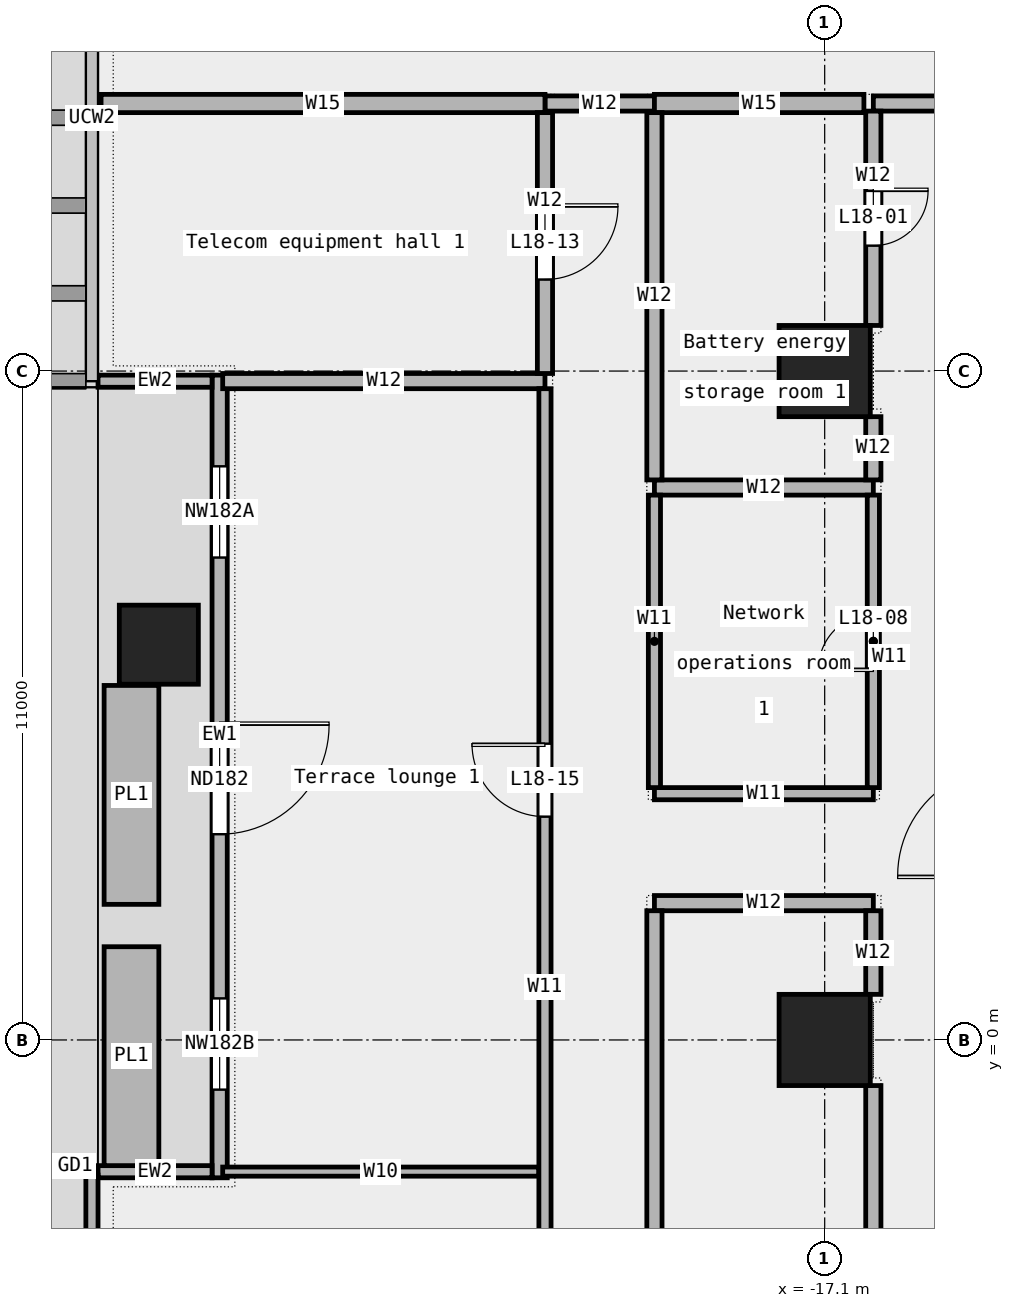
"""IFC4 building model, lengths in metres.
Left out: names, types, materials, properties, quantities, classifications, styles, units other than length and angle.
Written with IfcOpenShell. Run it as: python <this file> out.ifc"""

import sys

from ifc_helpers import new_model, si_unit, direction, frame, frame_2d, origin, origin_2d, place, context, subcontext, project, spatial, rectangle, extrude, element, fill, save


model = new_model("IFC4")
c1 = context("Model", 3, precision=1e-05, world=origin(), true_north=direction((0.0, 1.0)))
c2 = subcontext(c1, "Body", "Model", "MODEL_VIEW")
j1 = project(units=[si_unit("LENGTHUNIT", "METRE"), si_unit("PLANEANGLEUNIT", "RADIAN")], contexts=[c1])
p1 = place(None, origin())
s1 = spatial("IfcSite", under=j1, at=p1, CompositionType="ELEMENT")
p2 = place(p1, origin())
s2 = spatial("IfcBuilding", under=s1, at=p2, CompositionType="ELEMENT")
p3 = place(p2, frame((0.0, 0.0, 94.6)))
s3 = spatial("IfcBuildingStorey", under=s2, at=p3, CompositionType="ELEMENT", Elevation=94.6)
p4 = place(p3, frame((-28.05, 6.5, 0.0), z_axis=(0.0, 0.0, 1.0), x_axis=(1.0, 0.0, 0.0)))
e1 = element("IfcColumn", 1, at=p4, inside=s3, PredefinedType="COLUMN", context=c2, shape_type="SweptSolid", body=[
    extrude(rectangle(XDim=1.3, YDim=1.3, at=origin_2d()), origin(), (0.0, 0.0, 1.0), 4.05),
])
for number, where, z_axis, x_axis in (
    (2, (-17.1, 0.0, 0.0), (0.0, 0.0, 1.0), (1.0, 0.0, 0.0)),
    (3, (-17.1, 11.0, 0.0), (0.0, 0.0, 1.0), (1.0, 0.0, 0.0)),
):
    element("IfcColumn", number, at=place(p3, frame(where, z_axis=z_axis, x_axis=x_axis)), inside=s3, PredefinedType="COLUMN", context=c2, shape_type="SweptSolid", body=[
        extrude(rectangle(XDim=1.5, YDim=1.5, at=origin_2d()), origin(), (0.0, 0.0, 1.0), 4.05),
    ])
p5 = place(p3, frame((-27.05, 10.933, 0.0), z_axis=(0.0, 0.0, 1.0), x_axis=(0.0, -1.0, 0.0)))
e4 = element("IfcWall", 4, at=p5, inside=s3, PredefinedType="STANDARD", context=c2, shape_type="SweptSolid", body=[
    extrude(rectangle(XDim=13.2, YDim=0.25, at=frame_2d((6.6, 0.0))), origin(), (0.0, 0.0, 1.0), 4.05),
])
p6 = place(p5, frame((1.5, 0.0, 0.45)))
e5 = element("IfcOpeningElement", 5, at=p6, cuts=e4, PredefinedType="OPENING", context=c2, shape_type="SweptSolid", body=[
    extrude(rectangle(XDim=1.5, YDim=3.0, at=frame_2d((0.75, 1.5))), frame((0.0, 0.137, 0.0), z_axis=(0.0, -1.0, 0.0), x_axis=(1.0, 0.0, 0.0)), (0.0, 0.0, 1.0), 0.274),
])
p7 = place(p5, frame((5.75, 0.0, 0.0)))
e6 = element("IfcOpeningElement", 6, at=p7, cuts=e4, PredefinedType="OPENING", context=c2, shape_type="SweptSolid", body=[
    extrude(rectangle(XDim=1.8, YDim=2.4, at=frame_2d((0.9, 1.2))), frame((0.0, 0.137, 0.0), z_axis=(0.0, -1.0, 0.0), x_axis=(1.0, 0.0, 0.0)), (0.0, 0.0, 1.0), 0.274),
])
p8 = place(p5, frame((10.25, 0.0, 0.45)))
e7 = element("IfcOpeningElement", 7, at=p8, cuts=e4, PredefinedType="OPENING", context=c2, shape_type="SweptSolid", body=[
    extrude(rectangle(XDim=1.5, YDim=3.0, at=frame_2d((0.75, 1.5))), frame((0.0, 0.137, 0.0), z_axis=(0.0, -1.0, 0.0), x_axis=(1.0, 0.0, 0.0)), (0.0, 0.0, 1.0), 0.274),
])
for number, where, z_axis, x_axis in (
    (8, (-29.05, 10.833, 0.0), (0.0, 0.0, 1.0), (1.0, 0.0, 0.0)),
    (9, (-29.05, -2.167, 0.0), (0.0, 0.0, 1.0), (1.0, 0.0, 0.0)),
):
    element("IfcWall", number, at=place(p3, frame(where, z_axis=z_axis, x_axis=x_axis)), inside=s3, PredefinedType="STANDARD", context=c2, shape_type="SweptSolid", body=[
        extrude(rectangle(XDim=1.875, YDim=0.2, at=frame_2d((0.938, 0.0))), origin(), (0.0, 0.0, 1.0), 4.05),
    ])
for number, where, z_axis, x_axis in (
    (10, (-28.5, 5.83, 0.0), (0.0, 0.0, 1.0), (0.0, -1.0, 0.0)),
    (11, (-28.5, 1.533, 0.0), (0.0, 0.0, 1.0), (0.0, -1.0, 0.0)),
):
    element("IfcWall", number, at=place(p3, frame(where, z_axis=z_axis, x_axis=x_axis)), inside=s3, PredefinedType="STANDARD", context=c2, shape_type="SweptSolid", body=[
        extrude(rectangle(XDim=3.6, YDim=0.9, at=frame_2d((1.8, 0.0))), origin(), (0.0, 0.0, 1.0), 0.7),
    ])
p9 = place(p3, frame((-29.15, -2.222, 0.0), z_axis=(0.0, 0.0, 1.0), x_axis=(0.0, -1.0, 0.0)))
e12 = element("IfcWall", 12, at=p9, inside=s3, PredefinedType="STANDARD", context=c2, shape_type="SweptSolid", body=[
    extrude(rectangle(XDim=4.223, YDim=0.2, at=frame_2d((2.112, 0.0))), origin(), (0.0, 0.0, 1.0), 4.05),
])
p10 = place(p9, frame((1.295, 0.0, 0.0)))
e13 = element("IfcOpeningElement", 13, at=p10, cuts=e12, PredefinedType="OPENING", context=c2, shape_type="SweptSolid", body=[
    extrude(rectangle(XDim=1.8, YDim=2.4, at=frame_2d((0.9, 1.2))), frame((0.0, 0.112, 0.0), z_axis=(0.0, -1.0, 0.0), x_axis=(1.0, 0.0, 0.0)), (0.0, 0.0, 1.0), 0.224),
])
p11 = place(p3, frame((-27.0, -2.165, 0.0), z_axis=(0.0, 0.0, 1.0), x_axis=(1.0, 0.0, 0.0)))
e14 = element("IfcWall", 14, at=p11, inside=s3, PredefinedType="PARTITIONING", context=c2, shape_type="SweptSolid", body=[
    extrude(rectangle(XDim=5.2, YDim=0.15, at=frame_2d((2.6, 0.0))), origin(), (0.0, 0.0, 1.0), 4.05),
])
p12 = place(p3, frame((-19.9, 2.25, 0.0), z_axis=(0.0, 0.0, 1.0), x_axis=(1.0, 0.0, 0.0)))
e15 = element("IfcWall", 15, at=p12, inside=s3, PredefinedType="PARTITIONING", context=c2, shape_type="SweptSolid", body=[
    extrude(rectangle(XDim=3.6, YDim=0.25, at=frame_2d((1.8, 0.0))), origin(), (0.0, 0.0, 1.0), 4.05),
])
p13 = place(p3, frame((-19.9, 4.05, 0.0), z_axis=(0.0, 0.0, 1.0), x_axis=(1.0, 0.0, 0.0)))
e16 = element("IfcWall", 16, at=p13, inside=s3, PredefinedType="PARTITIONING", context=c2, shape_type="SweptSolid", body=[
    extrude(rectangle(XDim=3.6, YDim=0.2, at=frame_2d((1.8, 0.0))), origin(), (0.0, 0.0, 1.0), 4.05),
])
p14 = place(p3, frame((-19.9, 9.085, 0.0), z_axis=(0.0, 0.0, 1.0), x_axis=(1.0, 0.0, 0.0)))
e17 = element("IfcWall", 17, at=p14, inside=s3, PredefinedType="PARTITIONING", context=c2, shape_type="SweptSolid", body=[
    extrude(rectangle(XDim=3.6, YDim=0.25, at=frame_2d((1.8, 0.0))), origin(), (0.0, 0.0, 1.0), 4.05),
])
p15 = place(p3, frame((-27.0, 10.835, 0.0), z_axis=(0.0, 0.0, 1.0), x_axis=(1.0, 0.0, 0.0)))
e18 = element("IfcWall", 18, at=p15, inside=s3, PredefinedType="PARTITIONING", context=c2, shape_type="SweptSolid", body=[
    extrude(rectangle(XDim=5.3, YDim=0.25, at=frame_2d((2.65, 0.0))), origin(), (0.0, 0.0, 1.0), 4.05),
])
p16 = place(p3, frame((-21.7, 15.4, 0.0), z_axis=(0.0, 0.0, 1.0), x_axis=(1.0, 0.0, 0.0)))
e19 = element("IfcWall", 19, at=p16, inside=s3, PredefinedType="PARTITIONING", context=c2, shape_type="SweptSolid", body=[
    extrude(rectangle(XDim=1.8, YDim=0.25, at=frame_2d((0.9, 0.0))), origin(), (0.0, 0.0, 1.0), 4.05),
])
p17 = place(p3, frame((-16.3, 15.4, 0.0), z_axis=(0.0, 0.0, 1.0), x_axis=(1.0, 0.0, 0.0)))
e20 = element("IfcWall", 20, at=p17, inside=s3, PredefinedType="PARTITIONING", context=c2, shape_type="SweptSolid", body=[
    extrude(rectangle(XDim=17.3, YDim=0.25, at=frame_2d((8.65, 0.0))), origin(), (0.0, 0.0, 1.0), 4.05),
])
p18 = place(p17, frame((12.085, 0.0, 0.0)))
e21 = element("IfcOpeningElement", 21, at=p18, cuts=e20, PredefinedType="OPENING", context=c2, shape_type="SweptSolid", body=[
    extrude(rectangle(XDim=1.2, YDim=2.1, at=frame_2d((0.6, 1.05))), frame((0.0, 0.137, 0.0), z_axis=(0.0, -1.0, 0.0), x_axis=(1.0, 0.0, 0.0)), (0.0, 0.0, 1.0), 0.274),
])
p19 = place(p17, frame((3.135, 0.0, 0.0)))
e22 = element("IfcOpeningElement", 22, at=p19, cuts=e20, PredefinedType="OPENING", context=c2, shape_type="SweptSolid", body=[
    extrude(rectangle(XDim=1.8, YDim=2.1, at=frame_2d((0.9, 1.05))), frame((0.0, 0.137, 0.0), z_axis=(0.0, -1.0, 0.0), x_axis=(1.0, 0.0, 0.0)), (0.0, 0.0, 1.0), 0.274),
])
p20 = place(p3, frame((-29.0, 15.4, 0.0), z_axis=(0.0, 0.0, 1.0), x_axis=(1.0, 0.0, 0.0)))
e23 = element("IfcWall", 23, at=p20, inside=s3, PredefinedType="PARTITIONING", context=c2, shape_type="SweptSolid", body=[
    extrude(rectangle(XDim=7.3, YDim=0.3, at=frame_2d((3.65, 0.0))), origin(), (0.0, 0.0, 1.0), 4.05),
])
p21 = place(p3, frame((-19.9, 15.4, 0.0), z_axis=(0.0, 0.0, 1.0), x_axis=(1.0, 0.0, 0.0)))
e24 = element("IfcWall", 24, at=p21, inside=s3, PredefinedType="PARTITIONING", context=c2, shape_type="SweptSolid", body=[
    extrude(rectangle(XDim=3.445, YDim=0.3, at=frame_2d((1.722, 0.0))), origin(), (0.0, 0.0, 1.0), 4.05),
])
p22 = place(p3, frame((-21.7, -8.975, 0.0), z_axis=(0.0, 0.0, 1.0), x_axis=(0.0, 1.0, 0.0)))
e25 = element("IfcWall", 25, at=p22, inside=s3, PredefinedType="PARTITIONING", context=c2, shape_type="SweptSolid", body=[
    extrude(rectangle(XDim=19.685, YDim=0.2, at=frame_2d((9.843, 0.0))), origin(), (0.0, 0.0, 1.0), 4.05),
])
p23 = place(p22, frame((2.805, 0.0, 0.0)))
e26 = element("IfcOpeningElement", 26, at=p23, cuts=e25, PredefinedType="OPENING", context=c2, shape_type="SweptSolid", body=[
    extrude(rectangle(XDim=1.2, YDim=2.1, at=frame_2d((0.6, 1.05))), frame((0.0, 0.112, 0.0), z_axis=(0.0, -1.0, 0.0), x_axis=(1.0, 0.0, 0.0)), (0.0, 0.0, 1.0), 0.224),
])
p24 = place(p22, frame((12.647, 0.0, 0.0)))
e27 = element("IfcOpeningElement", 27, at=p24, cuts=e25, PredefinedType="OPENING", context=c2, shape_type="SweptSolid", body=[
    extrude(rectangle(XDim=1.2, YDim=2.1, at=frame_2d((0.6, 1.05))), frame((0.0, 0.112, 0.0), z_axis=(0.0, -1.0, 0.0), x_axis=(1.0, 0.0, 0.0)), (0.0, 0.0, 1.0), 0.224),
])
p25 = place(p3, frame((-21.7, 10.96, 0.0), z_axis=(0.0, 0.0, 1.0), x_axis=(0.0, 1.0, 0.0)))
e28 = element("IfcWall", 28, at=p25, inside=s3, PredefinedType="PARTITIONING", context=c2, shape_type="SweptSolid", body=[
    extrude(rectangle(XDim=4.29, YDim=0.25, at=frame_2d((2.145, 0.0))), origin(), (0.0, 0.0, 1.0), 4.05),
])
p26 = place(p25, frame((1.545, 0.0, 0.0)))
e29 = element("IfcOpeningElement", 29, at=p26, cuts=e28, PredefinedType="OPENING", context=c2, shape_type="SweptSolid", body=[
    extrude(rectangle(XDim=1.2, YDim=2.1, at=frame_2d((0.6, 1.05))), frame((0.0, 0.137, 0.0), z_axis=(0.0, -1.0, 0.0), x_axis=(1.0, 0.0, 0.0)), (0.0, 0.0, 1.0), 0.274),
])
p27 = place(p3, frame((-19.9, 4.15, 0.0), z_axis=(0.0, 0.0, 1.0), x_axis=(0.0, 1.0, 0.0)))
e30 = element("IfcWall", 30, at=p27, inside=s3, PredefinedType="PARTITIONING", context=c2, shape_type="SweptSolid", body=[
    extrude(rectangle(XDim=4.81, YDim=0.2, at=frame_2d((2.405, 0.0))), origin(), (0.0, 0.0, 1.0), 4.05),
])
p28 = place(p3, frame((-19.9, -8.95, 0.0), z_axis=(0.0, 0.0, 1.0), x_axis=(0.0, 1.0, 0.0)))
e31 = element("IfcWall", 31, at=p28, inside=s3, PredefinedType="PARTITIONING", context=c2, shape_type="SweptSolid", body=[
    extrude(rectangle(XDim=11.075, YDim=0.25, at=frame_2d((5.538, 0.0))), origin(), (0.0, 0.0, 1.0), 4.05),
])
p29 = place(p3, frame((-19.9, 9.21, 0.0), z_axis=(0.0, 0.0, 1.0), x_axis=(0.0, 1.0, 0.0)))
e32 = element("IfcWall", 32, at=p29, inside=s3, PredefinedType="PARTITIONING", context=c2, shape_type="SweptSolid", body=[
    extrude(rectangle(XDim=6.04, YDim=0.25, at=frame_2d((3.02, 0.0))), origin(), (0.0, 0.0, 1.0), 4.05),
])
p30 = place(p3, frame((-16.3, 4.15, 0.0), z_axis=(0.0, 0.0, 1.0), x_axis=(0.0, 1.0, 0.0)))
e33 = element("IfcWall", 33, at=p30, inside=s3, PredefinedType="PARTITIONING", context=c2, shape_type="SweptSolid", body=[
    extrude(rectangle(XDim=4.81, YDim=0.2, at=frame_2d((2.405, 0.0))), origin(), (0.0, 0.0, 1.0), 4.05),
])
p31 = place(p30, frame((1.955, 0.0, 0.0)))
e34 = element("IfcOpeningElement", 34, at=p31, cuts=e33, PredefinedType="OPENING", context=c2, shape_type="SweptSolid", body=[
    extrude(rectangle(XDim=0.9, YDim=2.1, at=frame_2d((0.45, 1.05))), frame((0.0, 0.112, 0.0), z_axis=(0.0, -1.0, 0.0), x_axis=(1.0, 0.0, 0.0)), (0.0, 0.0, 1.0), 0.224),
])
p32 = place(p3, frame((-16.3, -8.95, 0.0), z_axis=(0.0, 0.0, 1.0), x_axis=(0.0, 1.0, 0.0)))
e35 = element("IfcWall", 35, at=p32, inside=s3, PredefinedType="PARTITIONING", context=c2, shape_type="SweptSolid", body=[
    extrude(rectangle(XDim=8.2, YDim=0.25, at=frame_2d((4.1, 0.0))), origin(), (0.0, 0.0, 1.0), 4.05),
])
p33 = place(p32, frame((3.65, 0.0, 0.0)))
e36 = element("IfcOpeningElement", 36, at=p33, cuts=e35, PredefinedType="OPENING", context=c2, shape_type="SweptSolid", body=[
    extrude(rectangle(XDim=0.9, YDim=2.1, at=frame_2d((0.45, 1.05))), frame((0.0, 0.137, 0.0), z_axis=(0.0, -1.0, 0.0), x_axis=(1.0, 0.0, 0.0)), (0.0, 0.0, 1.0), 0.274),
])
p34 = place(p3, frame((-16.3, 0.75, 0.0), z_axis=(0.0, 0.0, 1.0), x_axis=(0.0, 1.0, 0.0)))
e37 = element("IfcWall", 37, at=p34, inside=s3, PredefinedType="PARTITIONING", context=c2, shape_type="SweptSolid", body=[
    extrude(rectangle(XDim=1.375, YDim=0.25, at=frame_2d((0.688, 0.0))), origin(), (0.0, 0.0, 1.0), 4.05),
])
p35 = place(p3, frame((-16.3, 9.21, 0.0), z_axis=(0.0, 0.0, 1.0), x_axis=(0.0, 1.0, 0.0)))
e38 = element("IfcWall", 38, at=p35, inside=s3, PredefinedType="PARTITIONING", context=c2, shape_type="SweptSolid", body=[
    extrude(rectangle(XDim=1.04, YDim=0.25, at=frame_2d((0.52, 0.0))), origin(), (0.0, 0.0, 1.0), 4.05),
])
p36 = place(p3, frame((-16.3, 11.75, 0.0), z_axis=(0.0, 0.0, 1.0), x_axis=(0.0, 1.0, 0.0)))
e39 = element("IfcWall", 39, at=p36, inside=s3, PredefinedType="PARTITIONING", context=c2, shape_type="SweptSolid", body=[
    extrude(rectangle(XDim=3.525, YDim=0.25, at=frame_2d((1.762, 0.0))), origin(), (0.0, 0.0, 1.0), 4.05),
])
p37 = place(p36, frame((1.312, 0.0, 0.0)))
e40 = element("IfcOpeningElement", 40, at=p37, cuts=e39, PredefinedType="OPENING", context=c2, shape_type="SweptSolid", body=[
    extrude(rectangle(XDim=0.9, YDim=2.1, at=frame_2d((0.45, 1.05))), frame((0.0, 0.137, 0.0), z_axis=(0.0, -1.0, 0.0), x_axis=(1.0, 0.0, 0.0)), (0.0, 0.0, 1.0), 0.274),
])
p38 = place(p6, origin())
e41 = element("IfcWindow", 41, at=p38, inside=s3, PartitioningType="SINGLE_PANEL", PredefinedType="WINDOW", context=c2, shape_type="SweptSolid", body=[
    extrude(rectangle(XDim=1.5, YDim=3.0, at=frame_2d((0.75, 1.5))), frame((0.0, 0.03, 0.0), z_axis=(0.0, -1.0, 0.0), x_axis=(1.0, 0.0, 0.0)), (0.0, 0.0, 1.0), 0.06),
])
fill(e5, e41)
p39 = place(p7, origin())
e42 = element("IfcDoor", 42, at=p39, inside=s3, OperationType="DOUBLE_DOOR_SINGLE_SWING", PredefinedType="DOOR", context=c2, shape_type="SweptSolid", body=[
    extrude(rectangle(XDim=1.8, YDim=2.4, at=frame_2d((0.9, 1.2))), frame((0.0, 0.025, 0.0), z_axis=(0.0, -1.0, 0.0), x_axis=(1.0, 0.0, 0.0)), (0.0, 0.0, 1.0), 0.05),
])
fill(e6, e42)
p40 = place(p8, origin())
e43 = element("IfcWindow", 43, at=p40, inside=s3, PartitioningType="SINGLE_PANEL", PredefinedType="WINDOW", context=c2, shape_type="SweptSolid", body=[
    extrude(rectangle(XDim=1.5, YDim=3.0, at=frame_2d((0.75, 1.5))), frame((0.0, 0.03, 0.0), z_axis=(0.0, -1.0, 0.0), x_axis=(1.0, 0.0, 0.0)), (0.0, 0.0, 1.0), 0.06),
])
fill(e7, e43)
p41 = place(p37, origin())
e44 = element("IfcDoor", 44, at=p41, inside=s3, OperationType="SINGLE_SWING_LEFT", PredefinedType="DOOR", context=c2, shape_type="SweptSolid", body=[
    extrude(rectangle(XDim=0.9, YDim=2.1, at=frame_2d((0.45, 1.05))), frame((0.0, 0.025, 0.0), z_axis=(0.0, -1.0, 0.0), x_axis=(1.0, 0.0, 0.0)), (0.0, 0.0, 1.0), 0.05),
])
fill(e40, e44)
p42 = place(p31, origin())
e45 = element("IfcDoor", 45, at=p42, inside=s3, OperationType="SINGLE_SWING_LEFT", PredefinedType="DOOR", context=c2, shape_type="SweptSolid", body=[
    extrude(rectangle(XDim=0.9, YDim=2.1, at=frame_2d((0.45, 1.05))), frame((0.0, 0.025, 0.0), z_axis=(0.0, -1.0, 0.0), x_axis=(1.0, 0.0, 0.0)), (0.0, 0.0, 1.0), 0.05),
])
fill(e34, e45)
p43 = place(p26, origin())
e46 = element("IfcDoor", 46, at=p43, inside=s3, OperationType="SINGLE_SWING_LEFT", PredefinedType="DOOR", context=c2, shape_type="SweptSolid", body=[
    extrude(rectangle(XDim=1.2, YDim=2.1, at=frame_2d((0.6, 1.05))), frame((0.0, 0.025, 0.0), z_axis=(0.0, -1.0, 0.0), x_axis=(1.0, 0.0, 0.0)), (0.0, 0.0, 1.0), 0.05),
])
fill(e29, e46)
p44 = place(p24, origin())
e47 = element("IfcDoor", 47, at=p44, inside=s3, OperationType="SINGLE_SWING_RIGHT", PredefinedType="DOOR", context=c2, shape_type="SweptSolid", body=[
    extrude(rectangle(XDim=1.2, YDim=2.1, at=frame_2d((0.6, 1.05))), frame((0.0, 0.025, 0.0), z_axis=(0.0, -1.0, 0.0), x_axis=(1.0, 0.0, 0.0)), (0.0, 0.0, 1.0), 0.05),
])
fill(e27, e47)
save(model, sys.argv[1])
